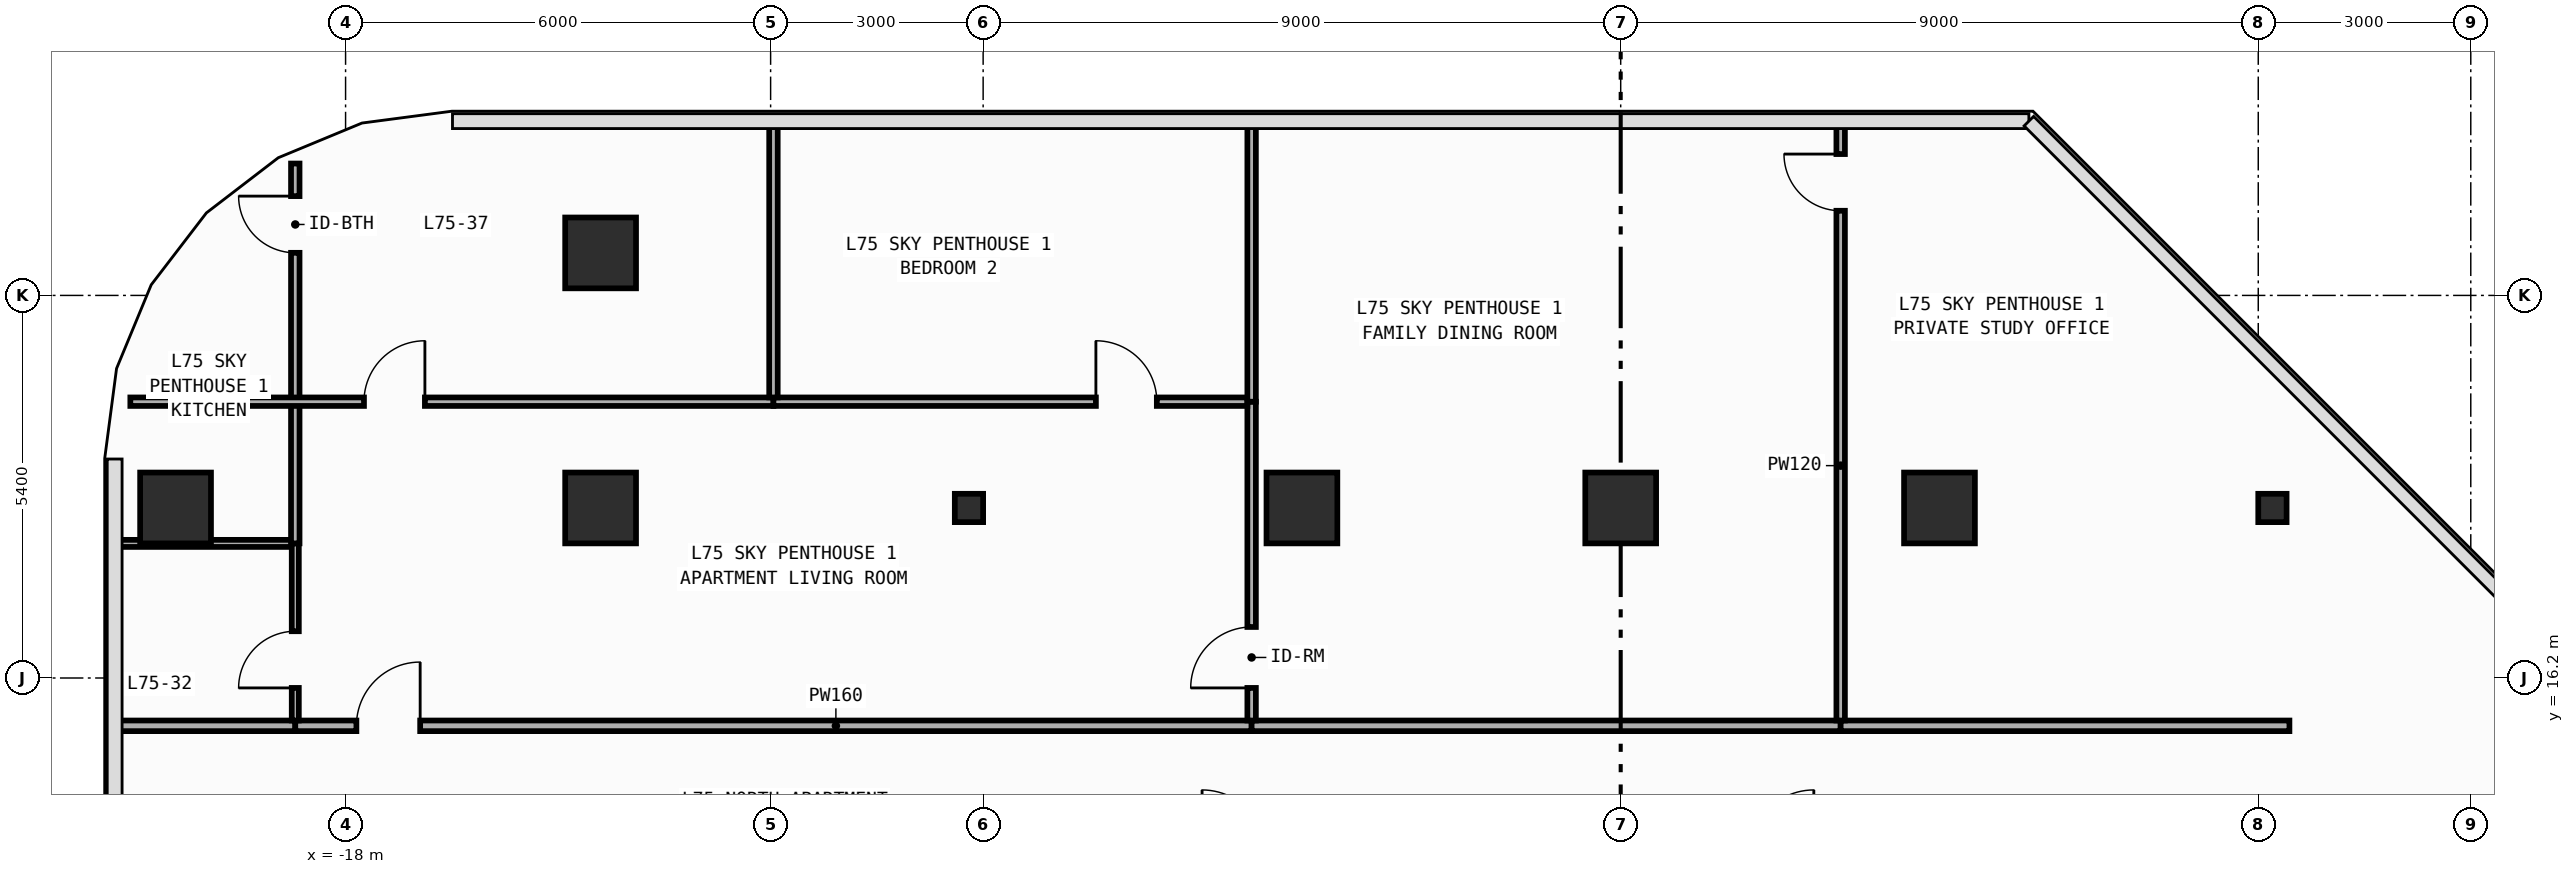
"""IFC4 building model, lengths in metres.
Left out: names, types, materials, properties, quantities, classifications, styles, units other than length and angle.
Written with IfcOpenShell. Run it as: python <this file> out.ifc"""

import sys

from ifc_helpers import new_model, si_unit, direction, frame, frame_2d, origin, origin_2d, place, context, subcontext, project, spatial, rectangle, circle, i_section, extrude, element, fill, save


model = new_model("IFC4")
c1 = context("Model", 3, precision=1e-05, world=origin(), true_north=direction((0.0, 1.0)))
c2 = subcontext(c1, "Body", "Model", "MODEL_VIEW")
j1 = project(units=[si_unit("LENGTHUNIT", "METRE"), si_unit("PLANEANGLEUNIT", "RADIAN")], contexts=[c1])
p1 = place(None, origin())
s1 = spatial("IfcSite", under=j1, at=p1, CompositionType="ELEMENT")
p2 = place(p1, origin())
s2 = spatial("IfcBuilding", under=s1, at=p2, CompositionType="ELEMENT")
p3 = place(p2, frame((0.0, 0.0, 311.8)))
s3 = spatial("IfcBuildingStorey", under=s2, at=p3, CompositionType="ELEMENT", Elevation=311.8)
for number, where, z_axis, x_axis in (
    (1, (-9.2, 18.6, 0.0), (0.0, 0.0, 1.0), (1.0, 0.0, 0.0)),
    (2, (9.2, 18.6, 0.0), (0.0, 0.0, 1.0), (1.0, 0.0, 0.0)),
):
    element("IfcColumn", number, at=place(p3, frame(where, z_axis=z_axis, x_axis=x_axis)), inside=s3, PredefinedType="COLUMN", context=c2, shape_type="SweptSolid", body=[
        extrude(i_section(OverallWidth=0.4, OverallDepth=0.4, WebThickness=0.013, FlangeThickness=0.021, FilletRadius=0.022, at=origin_2d()), origin(), (0.0, 0.0, 1.0), 3.8),
    ])
for number, where, z_axis, x_axis in (
    (3, (-20.4, 18.6, 0.0), (0.0, 0.0, 1.0), (1.0, 0.0, 0.0)),
    (4, (-14.4, 18.6, 0.0), (0.0, 0.0, 1.0), (1.0, 0.0, 0.0)),
    (5, (-4.5, 18.6, 0.0), (0.0, 0.0, 1.0), (1.0, 0.0, 0.0)),
    (6, (0.0, 18.6, 0.0), (0.0, 0.0, 1.0), (1.0, 0.0, 0.0)),
    (7, (4.5, 18.6, 0.0), (0.0, 0.0, 1.0), (1.0, 0.0, 0.0)),
    (8, (-14.4, 22.2, 0.0), (0.0, 0.0, 1.0), (1.0, 0.0, 0.0)),
):
    element("IfcColumn", number, at=place(p3, frame(where, z_axis=z_axis, x_axis=x_axis)), inside=s3, PredefinedType="COLUMN", context=c2, shape_type="SweptSolid", body=[
        extrude(circle(Radius=0.5, at=origin_2d()), origin(), (0.0, 0.0, 1.0), 3.8),
    ])
p4 = place(p3, frame((-21.255, 15.525, 0.0), z_axis=(0.0, 0.0, 1.0), x_axis=(1.0, 0.0, 0.0)))
e9 = element("IfcWall", 9, at=p4, inside=s3, PredefinedType="PARTITIONING", context=c2, shape_type="SweptSolid", body=[
    extrude(rectangle(XDim=2.545, YDim=0.15, at=frame_2d((1.272, 0.0))), origin(), (0.0, 0.0, 1.0), 3.54),
])
p5 = place(p3, frame((-18.71, 15.525, 0.0), z_axis=(0.0, 0.0, 1.0), x_axis=(1.0, 0.0, 0.0)))
e10 = element("IfcWall", 10, at=p5, inside=s3, PredefinedType="PARTITIONING", context=c2, shape_type="SweptSolid", body=[
    extrude(rectangle(XDim=13.5, YDim=0.15, at=frame_2d((6.75, 0.0))), origin(), (0.0, 0.0, 1.0), 3.54),
])
p6 = place(p5, frame((0.863, 0.0, 0.0)))
e11 = element("IfcOpeningElement", 11, at=p6, cuts=e10, PredefinedType="OPENING", context=c2, shape_type="SweptSolid", body=[
    extrude(rectangle(XDim=0.9, YDim=2.15, at=frame_2d((0.45, 1.075))), frame((0.0, 0.085, 0.0), z_axis=(0.0, -1.0, 0.0), x_axis=(1.0, 0.0, 0.0)), (0.0, 0.0, 1.0), 0.17),
])
p7 = place(p3, frame((-5.21, 15.525, 0.0), z_axis=(0.0, 0.0, 1.0), x_axis=(1.0, 0.0, 0.0)))
e12 = element("IfcWall", 12, at=p7, inside=s3, PredefinedType="PARTITIONING", context=c2, shape_type="SweptSolid", body=[
    extrude(rectangle(XDim=8.315, YDim=0.15, at=frame_2d((4.157, 0.0))), origin(), (0.0, 0.0, 1.0), 3.54),
])
p8 = place(p3, frame((3.105, 15.525, 0.0), z_axis=(0.0, 0.0, 1.0), x_axis=(1.0, 0.0, 0.0)))
e13 = element("IfcWall", 13, at=p8, inside=s3, PredefinedType="PARTITIONING", context=c2, shape_type="SweptSolid", body=[
    extrude(rectangle(XDim=6.335, YDim=0.15, at=frame_2d((3.167, 0.0))), origin(), (0.0, 0.0, 1.0), 3.54),
])
p9 = place(p3, frame((-21.255, 18.1, 0.0), z_axis=(0.0, 0.0, 1.0), x_axis=(1.0, 0.0, 0.0)))
e14 = element("IfcWall", 14, at=p9, inside=s3, PredefinedType="PARTITIONING", context=c2, shape_type="SweptSolid", body=[
    extrude(rectangle(XDim=2.495, YDim=0.1, at=frame_2d((1.248, 0.0))), origin(), (0.0, 0.0, 1.0), 3.54),
])
p10 = place(p3, frame((-18.71, 15.6, 0.0), z_axis=(0.0, 0.0, 1.0), x_axis=(0.0, 1.0, 0.0)))
e15 = element("IfcWall", 15, at=p10, inside=s3, PredefinedType="PARTITIONING", context=c2, shape_type="SweptSolid", body=[
    extrude(rectangle(XDim=2.5, YDim=0.1, at=frame_2d((1.25, 0.0))), origin(), (0.0, 0.0, 1.0), 3.54),
])
p11 = place(p10, frame((0.46, 0.0, 0.0)))
e16 = element("IfcOpeningElement", 16, at=p11, cuts=e15, PredefinedType="OPENING", context=c2, shape_type="SweptSolid", body=[
    extrude(rectangle(XDim=0.8, YDim=2.1, at=frame_2d((0.4, 1.05))), frame((0.0, 0.06, 0.0), z_axis=(0.0, -1.0, 0.0), x_axis=(1.0, 0.0, 0.0)), (0.0, 0.0, 1.0), 0.12),
])
p12 = place(p3, frame((-18.71, 18.1, 0.0), z_axis=(0.0, 0.0, 1.0), x_axis=(0.0, 1.0, 0.0)))
e17 = element("IfcWall", 17, at=p12, inside=s3, PredefinedType="PARTITIONING", context=c2, shape_type="SweptSolid", body=[
    extrude(rectangle(XDim=2.0, YDim=0.12, at=frame_2d((1.0, 0.0))), origin(), (0.0, 0.0, 1.0), 3.54),
])
p13 = place(p3, frame((-18.71, 20.1, 0.0), z_axis=(0.0, 0.0, 1.0), x_axis=(0.0, 1.0, 0.0)))
e18 = element("IfcWall", 18, at=p13, inside=s3, PredefinedType="PARTITIONING", context=c2, shape_type="SweptSolid", body=[
    extrude(rectangle(XDim=3.361, YDim=0.12, at=frame_2d((1.681, 0.0))), origin(), (0.0, 0.0, 1.0), 3.54),
])
p14 = place(p13, frame((2.102, 0.0, 0.0)))
e19 = element("IfcOpeningElement", 19, at=p14, cuts=e18, PredefinedType="OPENING", context=c2, shape_type="SweptSolid", body=[
    extrude(rectangle(XDim=0.8, YDim=2.1, at=frame_2d((0.4, 1.05))), frame((0.0, 0.07, 0.0), z_axis=(0.0, -1.0, 0.0), x_axis=(1.0, 0.0, 0.0)), (0.0, 0.0, 1.0), 0.14),
])
p15 = place(p3, frame((-5.21, 15.6, 0.0), z_axis=(0.0, 0.0, 1.0), x_axis=(0.0, 1.0, 0.0)))
e20 = element("IfcWall", 20, at=p15, inside=s3, PredefinedType="PARTITIONING", context=c2, shape_type="SweptSolid", body=[
    extrude(rectangle(XDim=4.5, YDim=0.12, at=frame_2d((2.25, 0.0))), origin(), (0.0, 0.0, 1.0), 3.54),
])
p16 = place(p15, frame((0.46, 0.0, 0.0)))
e21 = element("IfcOpeningElement", 21, at=p16, cuts=e20, PredefinedType="OPENING", context=c2, shape_type="SweptSolid", body=[
    extrude(rectangle(XDim=0.86, YDim=2.15, at=frame_2d((0.43, 1.075))), frame((0.0, 0.07, 0.0), z_axis=(0.0, -1.0, 0.0), x_axis=(1.0, 0.0, 0.0)), (0.0, 0.0, 1.0), 0.14),
])
p17 = place(p3, frame((-21.039, 20.1, 0.0), z_axis=(0.0, 0.0, 1.0), x_axis=(1.0, 0.0, 0.0)))
e22 = element("IfcWall", 22, at=p17, inside=s3, PredefinedType="PARTITIONING", context=c2, shape_type="SweptSolid", body=[
    extrude(rectangle(XDim=9.079, YDim=0.12, at=frame_2d((4.539, 0.0))), origin(), (0.0, 0.0, 1.0), 3.54),
])
p18 = place(p17, frame((3.298, 0.0, 0.0)))
e23 = element("IfcOpeningElement", 23, at=p18, cuts=e22, PredefinedType="OPENING", context=c2, shape_type="SweptSolid", body=[
    extrude(rectangle(XDim=0.86, YDim=2.15, at=frame_2d((0.43, 1.075))), frame((0.0, 0.07, 0.0), z_axis=(0.0, -1.0, 0.0), x_axis=(1.0, 0.0, 0.0)), (0.0, 0.0, 1.0), 0.14),
])
p19 = place(p3, frame((-11.96, 20.1, 0.0), z_axis=(0.0, 0.0, 1.0), x_axis=(1.0, 0.0, 0.0)))
e24 = element("IfcWall", 24, at=p19, inside=s3, PredefinedType="PARTITIONING", context=c2, shape_type="SweptSolid", body=[
    extrude(rectangle(XDim=6.69, YDim=0.12, at=frame_2d((3.345, 0.0))), origin(), (0.0, 0.0, 1.0), 3.54),
])
p20 = place(p19, frame((4.552, 0.0, 0.0)))
e25 = element("IfcOpeningElement", 25, at=p20, cuts=e24, PredefinedType="OPENING", context=c2, shape_type="SweptSolid", body=[
    extrude(rectangle(XDim=0.86, YDim=2.15, at=frame_2d((0.43, 1.075))), frame((0.0, 0.07, 0.0), z_axis=(0.0, -1.0, 0.0), x_axis=(1.0, 0.0, 0.0)), (0.0, 0.0, 1.0), 0.14),
])
p21 = place(p3, frame((3.105, 15.6, 0.0), z_axis=(0.0, 0.0, 1.0), x_axis=(0.0, 1.0, 0.0)))
e26 = element("IfcWall", 26, at=p21, inside=s3, PredefinedType="PARTITIONING", context=c2, shape_type="SweptSolid", body=[
    extrude(rectangle(XDim=8.455, YDim=0.12, at=frame_2d((4.228, 0.0))), origin(), (0.0, 0.0, 1.0), 3.54),
])
p22 = place(p21, frame((7.195, 0.0, 0.0)))
e27 = element("IfcOpeningElement", 27, at=p22, cuts=e26, PredefinedType="OPENING", context=c2, shape_type="SweptSolid", body=[
    extrude(rectangle(XDim=0.8, YDim=2.1, at=frame_2d((0.4, 1.05))), frame((0.0, 0.07, 0.0), z_axis=(0.0, -1.0, 0.0), x_axis=(1.0, 0.0, 0.0)), (0.0, 0.0, 1.0), 0.14),
])
p23 = place(p3, frame((-5.21, 20.1, 0.0), z_axis=(0.0, 0.0, 1.0), x_axis=(0.0, 1.0, 0.0)))
e28 = element("IfcWall", 28, at=p23, inside=s3, PredefinedType="PARTITIONING", context=c2, shape_type="SweptSolid", body=[
    extrude(rectangle(XDim=3.955, YDim=0.12, at=frame_2d((1.978, 0.0))), origin(), (0.0, 0.0, 1.0), 3.54),
])
p24 = place(p3, frame((-11.96, 20.16, 0.0), z_axis=(0.0, 0.0, 1.0), x_axis=(0.0, 1.0, 0.0)))
e29 = element("IfcWall", 29, at=p24, inside=s3, PredefinedType="PARTITIONING", context=c2, shape_type="SweptSolid", body=[
    extrude(rectangle(XDim=3.895, YDim=0.12, at=frame_2d((1.948, 0.0))), origin(), (0.0, 0.0, 1.0), 3.54),
])
p25 = place(p6, origin())
e30 = element("IfcDoor", 30, at=p25, inside=s3, OperationType="SINGLE_SWING_RIGHT", PredefinedType="DOOR", context=c2, shape_type="SweptSolid", body=[
    extrude(rectangle(XDim=0.9, YDim=2.15, at=frame_2d((0.45, 1.075))), frame((0.0, 0.025, 0.0), z_axis=(0.0, -1.0, 0.0), x_axis=(1.0, 0.0, 0.0)), (0.0, 0.0, 1.0), 0.05),
])
fill(e11, e30)
p26 = place(p11, origin())
e31 = element("IfcDoor", 31, at=p26, inside=s3, OperationType="SINGLE_SWING_LEFT", PredefinedType="DOOR", context=c2, shape_type="SweptSolid", body=[
    extrude(rectangle(XDim=0.8, YDim=2.1, at=frame_2d((0.4, 1.05))), frame((0.0, 0.025, 0.0), z_axis=(0.0, -1.0, 0.0), x_axis=(1.0, 0.0, 0.0)), (0.0, 0.0, 1.0), 0.05),
])
fill(e16, e31)
p27 = place(p16, origin())
e32 = element("IfcDoor", 32, at=p27, inside=s3, OperationType="SINGLE_SWING_LEFT", PredefinedType="DOOR", context=c2, shape_type="SweptSolid", body=[
    extrude(rectangle(XDim=0.86, YDim=2.15, at=frame_2d((0.43, 1.075))), frame((0.0, 0.025, 0.0), z_axis=(0.0, -1.0, 0.0), x_axis=(1.0, 0.0, 0.0)), (0.0, 0.0, 1.0), 0.05),
])
fill(e21, e32)
p28 = place(p18, origin())
e33 = element("IfcDoor", 33, at=p28, inside=s3, OperationType="SINGLE_SWING_RIGHT", PredefinedType="DOOR", context=c2, shape_type="SweptSolid", body=[
    extrude(rectangle(XDim=0.86, YDim=2.15, at=frame_2d((0.43, 1.075))), frame((0.0, 0.025, 0.0), z_axis=(0.0, -1.0, 0.0), x_axis=(1.0, 0.0, 0.0)), (0.0, 0.0, 1.0), 0.05),
])
fill(e23, e33)
p29 = place(p20, origin())
e34 = element("IfcDoor", 34, at=p29, inside=s3, OperationType="SINGLE_SWING_LEFT", PredefinedType="DOOR", context=c2, shape_type="SweptSolid", body=[
    extrude(rectangle(XDim=0.86, YDim=2.15, at=frame_2d((0.43, 1.075))), frame((0.0, 0.025, 0.0), z_axis=(0.0, -1.0, 0.0), x_axis=(1.0, 0.0, 0.0)), (0.0, 0.0, 1.0), 0.05),
])
fill(e25, e34)
p30 = place(p22, origin())
e35 = element("IfcDoor", 35, at=p30, inside=s3, OperationType="SINGLE_SWING_RIGHT", PredefinedType="DOOR", context=c2, shape_type="SweptSolid", body=[
    extrude(rectangle(XDim=0.8, YDim=2.1, at=frame_2d((0.4, 1.05))), frame((0.0, 0.025, 0.0), z_axis=(0.0, -1.0, 0.0), x_axis=(1.0, 0.0, 0.0)), (0.0, 0.0, 1.0), 0.05),
])
fill(e27, e35)
p31 = place(p14, origin())
e36 = element("IfcDoor", 36, at=p31, inside=s3, OperationType="SINGLE_SWING_RIGHT", PredefinedType="DOOR", context=c2, shape_type="SweptSolid", body=[
    extrude(rectangle(XDim=0.8, YDim=2.1, at=frame_2d((0.4, 1.05))), frame((0.0, 0.025, 0.0), z_axis=(0.0, -1.0, 0.0), x_axis=(1.0, 0.0, 0.0)), (0.0, 0.0, 1.0), 0.05),
])
fill(e19, e36)
save(model, sys.argv[1])
